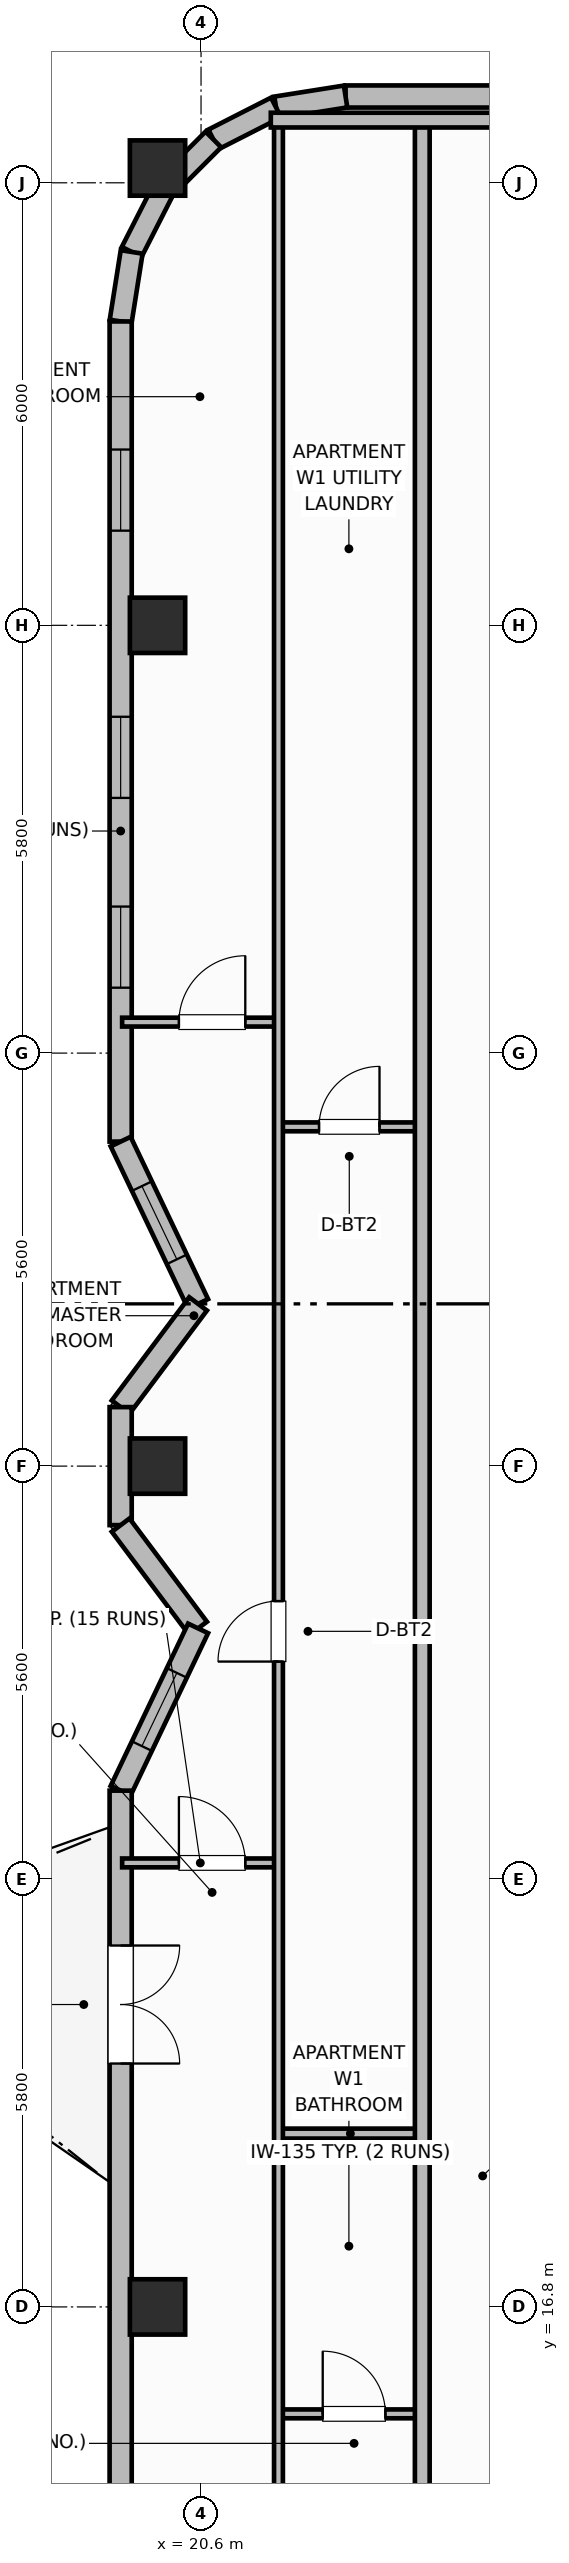
"""IFC4 building model, lengths in metres.
Left out: names, types, materials, properties, quantities, classifications, styles, units other than length and angle.
Written with IfcOpenShell. Run it as: python <this file> out.ifc"""

import sys

from ifc_helpers import new_model, si_unit, direction, frame, frame_2d, origin, origin_2d, place, context, subcontext, project, spatial, rectangle, extrude, element, fill, save


model = new_model("IFC4")
c1 = context("Model", 3, precision=1e-05, world=origin(), true_north=direction((0.0, 1.0)))
c2 = subcontext(c1, "Body", "Model", "MODEL_VIEW")
j1 = project(units=[si_unit("LENGTHUNIT", "METRE"), si_unit("PLANEANGLEUNIT", "RADIAN")], contexts=[c1])
p1 = place(None, origin())
s1 = spatial("IfcSite", under=j1, at=p1, CompositionType="ELEMENT")
p2 = place(p1, origin())
s2 = spatial("IfcBuilding", under=s1, at=p2, CompositionType="ELEMENT")
p3 = place(p2, frame((0.0, 0.0, 275.0)))
s3 = spatial("IfcBuildingStorey", under=s2, at=p3, CompositionType="ELEMENT", Elevation=275.0)
for number, where, z_axis, x_axis in (
    (1, (20.01, 16.8, 0.0), (0.0, 0.0, 1.0), (1.0, 0.0, 0.0)),
    (2, (20.01, 28.2, 0.0), (0.0, 0.0, 1.0), (1.0, 0.0, 0.0)),
    (3, (20.01, 39.6, 0.0), (0.0, 0.0, 1.0), (1.0, 0.0, 0.0)),
    (4, (20.01, 45.8, 0.0), (0.0, 0.0, 1.0), (1.0, 0.0, 0.0)),
):
    element("IfcColumn", number, at=place(p3, frame(where, z_axis=z_axis, x_axis=x_axis)), inside=s3, PredefinedType="COLUMN", context=c2, shape_type="SweptSolid", body=[
        extrude(rectangle(XDim=0.75, YDim=0.75, at=origin_2d()), origin(), (0.0, 0.0, 1.0), 3.7),
    ])
p4 = place(p3, frame((47.79, 46.77, 0.0), z_axis=(0.0, 0.0, 1.0), x_axis=(-1.0, 0.0, 0.0)))
e5 = element("IfcWall", 5, at=p4, inside=s3, PredefinedType="SOLIDWALL", context=c2, shape_type="SweptSolid", body=[
    extrude(rectangle(XDim=25.23, YDim=0.3, at=frame_2d((12.615, 0.0))), origin(), (0.0, 0.0, 1.0), 2.73),
])
p5 = place(p4, frame((1.446, 0.0, 0.76)))
e6 = element("IfcOpeningElement", 6, at=p5, cuts=e5, PredefinedType="OPENING", context=c2, shape_type="SweptSolid", body=[
    extrude(rectangle(XDim=1.4, YDim=1.85, at=frame_2d((0.7, 0.925))), frame((0.0, 0.16, 0.0), z_axis=(0.0, -1.0, 0.0), x_axis=(1.0, 0.0, 0.0)), (0.0, 0.0, 1.0), 0.32),
])
p6 = place(p4, frame((7.428, 0.0, 0.76)))
e7 = element("IfcOpeningElement", 7, at=p6, cuts=e5, PredefinedType="OPENING", context=c2, shape_type="SweptSolid", body=[
    extrude(rectangle(XDim=1.4, YDim=1.85, at=frame_2d((0.7, 0.925))), frame((0.0, 0.16, 0.0), z_axis=(0.0, -1.0, 0.0), x_axis=(1.0, 0.0, 0.0)), (0.0, 0.0, 1.0), 0.32),
])
p7 = place(p4, frame((9.719, 0.0, 0.76)))
e8 = element("IfcOpeningElement", 8, at=p7, cuts=e5, PredefinedType="OPENING", context=c2, shape_type="SweptSolid", body=[
    extrude(rectangle(XDim=1.4, YDim=1.85, at=frame_2d((0.7, 0.925))), frame((0.0, 0.16, 0.0), z_axis=(0.0, -1.0, 0.0), x_axis=(1.0, 0.0, 0.0)), (0.0, 0.0, 1.0), 0.32),
])
p8 = place(p4, frame((14.111, 0.0, 0.76)))
e9 = element("IfcOpeningElement", 9, at=p8, cuts=e5, PredefinedType="OPENING", context=c2, shape_type="SweptSolid", body=[
    extrude(rectangle(XDim=1.4, YDim=1.85, at=frame_2d((0.7, 0.925))), frame((0.0, 0.16, 0.0), z_axis=(0.0, -1.0, 0.0), x_axis=(1.0, 0.0, 0.0)), (0.0, 0.0, 1.0), 0.32),
])
p9 = place(p4, frame((16.402, 0.0, 0.76)))
e10 = element("IfcOpeningElement", 10, at=p9, cuts=e5, PredefinedType="OPENING", context=c2, shape_type="SweptSolid", body=[
    extrude(rectangle(XDim=1.4, YDim=1.85, at=frame_2d((0.7, 0.925))), frame((0.0, 0.16, 0.0), z_axis=(0.0, -1.0, 0.0), x_axis=(1.0, 0.0, 0.0)), (0.0, 0.0, 1.0), 0.32),
])
p10 = place(p4, frame((19.393, 0.0, 0.76)))
e11 = element("IfcOpeningElement", 11, at=p10, cuts=e5, PredefinedType="OPENING", context=c2, shape_type="SweptSolid", body=[
    extrude(rectangle(XDim=1.4, YDim=1.85, at=frame_2d((0.7, 0.925))), frame((0.0, 0.16, 0.0), z_axis=(0.0, -1.0, 0.0), x_axis=(1.0, 0.0, 0.0)), (0.0, 0.0, 1.0), 0.32),
])
p11 = place(p3, frame((22.56, 46.77, 0.0), z_axis=(0.0, 0.0, 1.0), x_axis=(-0.987669453596, -0.156553666304, 0.0)))
e12 = element("IfcWall", 12, at=p11, inside=s3, PredefinedType="SOLIDWALL", context=c2, shape_type="SweptSolid", body=[
    extrude(rectangle(XDim=0.954, YDim=0.3, at=frame_2d((0.477, 0.0))), origin(), (0.0, 0.0, 1.0), 2.73),
])
p12 = place(p3, frame((21.617, 46.621, 0.0), z_axis=(0.0, 0.0, 1.0), x_axis=(-0.891023873617, -0.45395644796, 0.0)))
e13 = element("IfcWall", 13, at=p12, inside=s3, PredefinedType="SOLIDWALL", context=c2, shape_type="SweptSolid", body=[
    extrude(rectangle(XDim=0.954, YDim=0.3, at=frame_2d((0.477, 0.0))), origin(), (0.0, 0.0, 1.0), 2.73),
])
p13 = place(p3, frame((20.767, 46.188, 0.0), z_axis=(0.0, 0.0, 1.0), x_axis=(-0.707106781187, -0.707106781187, 0.0)))
e14 = element("IfcWall", 14, at=p13, inside=s3, PredefinedType="SOLIDWALL", context=c2, shape_type="SweptSolid", body=[
    extrude(rectangle(XDim=0.954, YDim=0.3, at=frame_2d((0.477, 0.0))), origin(), (0.0, 0.0, 1.0), 2.73),
])
p14 = place(p3, frame((20.093, 45.513, 0.0), z_axis=(0.0, 0.0, 1.0), x_axis=(-0.454159573051, -0.890920356825, 0.0)))
e15 = element("IfcWall", 15, at=p14, inside=s3, PredefinedType="SOLIDWALL", context=c2, shape_type="SweptSolid", body=[
    extrude(rectangle(XDim=0.954, YDim=0.3, at=frame_2d((0.477, 0.0))), origin(), (0.0, 0.0, 1.0), 2.73),
])
p15 = place(p3, frame((19.659, 44.663, 0.0), z_axis=(0.0, 0.0, 1.0), x_axis=(-0.156304114255, -0.987708977314, 0.0)))
e16 = element("IfcWall", 16, at=p15, inside=s3, PredefinedType="SOLIDWALL", context=c2, shape_type="SweptSolid", body=[
    extrude(rectangle(XDim=0.954, YDim=0.3, at=frame_2d((0.477, 0.0))), origin(), (0.0, 0.0, 1.0), 2.73),
])
p16 = place(p3, frame((19.51, 43.72, 0.0), z_axis=(0.0, 0.0, 1.0), x_axis=(0.0, -1.0, 0.0)))
e17 = element("IfcWall", 17, at=p16, inside=s3, PredefinedType="SOLIDWALL", context=c2, shape_type="SweptSolid", body=[
    extrude(rectangle(XDim=11.12, YDim=0.3, at=frame_2d((5.56, 0.0))), origin(), (0.0, 0.0, 1.0), 2.73),
])
p17 = place(p16, frame((1.737, 0.0, 0.95)))
e18 = element("IfcOpeningElement", 18, at=p17, cuts=e17, PredefinedType="OPENING", context=c2, shape_type="SweptSolid", body=[
    extrude(rectangle(XDim=1.1, YDim=1.65, at=frame_2d((0.55, 0.825))), frame((0.0, 0.16, 0.0), z_axis=(0.0, -1.0, 0.0), x_axis=(1.0, 0.0, 0.0)), (0.0, 0.0, 1.0), 0.32),
])
p18 = place(p16, frame((5.36, 0.0, 0.95)))
e19 = element("IfcOpeningElement", 19, at=p18, cuts=e17, PredefinedType="OPENING", context=c2, shape_type="SweptSolid", body=[
    extrude(rectangle(XDim=1.1, YDim=1.65, at=frame_2d((0.55, 0.825))), frame((0.0, 0.16, 0.0), z_axis=(0.0, -1.0, 0.0), x_axis=(1.0, 0.0, 0.0)), (0.0, 0.0, 1.0), 0.32),
])
p19 = place(p16, frame((7.933, 0.0, 0.95)))
e20 = element("IfcOpeningElement", 20, at=p19, cuts=e17, PredefinedType="OPENING", context=c2, shape_type="SweptSolid", body=[
    extrude(rectangle(XDim=1.1, YDim=1.65, at=frame_2d((0.55, 0.825))), frame((0.0, 0.16, 0.0), z_axis=(0.0, -1.0, 0.0), x_axis=(1.0, 0.0, 0.0)), (0.0, 0.0, 1.0), 0.32),
])
p20 = place(p3, frame((19.51, 32.6, 0.0), z_axis=(0.0, 0.0, 1.0), x_axis=(0.430714756408, -0.902488115496, 0.0)))
e21 = element("IfcWall", 21, at=p20, inside=s3, PredefinedType="SOLIDWALL", context=c2, shape_type="SweptSolid", body=[
    extrude(rectangle(XDim=2.438, YDim=0.3, at=frame_2d((1.219, 0.0))), origin(), (0.0, 0.0, 1.0), 2.73),
])
p21 = place(p20, frame((0.669, 0.0, 0.92)))
e22 = element("IfcOpeningElement", 22, at=p21, cuts=e21, PredefinedType="OPENING", context=c2, shape_type="SweptSolid", body=[
    extrude(rectangle(XDim=1.1, YDim=1.65, at=frame_2d((0.55, 0.825))), frame((0.0, 0.16, 0.0), z_axis=(0.0, -1.0, 0.0), x_axis=(1.0, 0.0, 0.0)), (0.0, 0.0, 1.0), 0.32),
])
p22 = place(p3, frame((20.56, 30.4, 0.0), z_axis=(0.0, 0.0, 1.0), x_axis=(-0.600044643168, -0.799966515677, 0.0)))
e23 = element("IfcWall", 23, at=p22, inside=s3, PredefinedType="SOLIDWALL", context=c2, shape_type="SweptSolid", body=[
    extrude(rectangle(XDim=1.75, YDim=0.3, at=frame_2d((0.875, 0.0))), origin(), (0.0, 0.0, 1.0), 2.73),
])
p23 = place(p3, frame((19.51, 29.0, 0.0), z_axis=(0.0, 0.0, 1.0), x_axis=(0.0, -1.0, 0.0)))
e24 = element("IfcWall", 24, at=p23, inside=s3, PredefinedType="SOLIDWALL", context=c2, shape_type="SweptSolid", body=[
    extrude(rectangle(XDim=1.6, YDim=0.3, at=frame_2d((0.8, 0.0))), origin(), (0.0, 0.0, 1.0), 2.73),
])
p24 = place(p3, frame((19.51, 27.4, 0.0), z_axis=(0.0, 0.0, 1.0), x_axis=(0.600044643168, -0.799966515677, 0.0)))
e25 = element("IfcWall", 25, at=p24, inside=s3, PredefinedType="SOLIDWALL", context=c2, shape_type="SweptSolid", body=[
    extrude(rectangle(XDim=1.75, YDim=0.3, at=frame_2d((0.875, 0.0))), origin(), (0.0, 0.0, 1.0), 2.73),
])
p25 = place(p3, frame((20.56, 26.0, 0.0), z_axis=(0.0, 0.0, 1.0), x_axis=(-0.430753686581, -0.902469534941, 0.0)))
e26 = element("IfcWall", 26, at=p25, inside=s3, PredefinedType="SOLIDWALL", context=c2, shape_type="SweptSolid", body=[
    extrude(rectangle(XDim=2.438, YDim=0.3, at=frame_2d((1.219, 0.0))), origin(), (0.0, 0.0, 1.0), 2.73),
])
p26 = place(p25, frame((0.669, 0.0, 0.92)))
e27 = element("IfcOpeningElement", 27, at=p26, cuts=e26, PredefinedType="OPENING", context=c2, shape_type="SweptSolid", body=[
    extrude(rectangle(XDim=1.1, YDim=1.65, at=frame_2d((0.55, 0.825))), frame((0.0, 0.16, 0.0), z_axis=(0.0, -1.0, 0.0), x_axis=(1.0, 0.0, 0.0)), (0.0, 0.0, 1.0), 0.32),
])
p27 = place(p3, frame((19.51, 23.8, 0.0), z_axis=(0.0, 0.0, 1.0), x_axis=(0.0, -1.0, 0.0)))
e28 = element("IfcWall", 28, at=p27, inside=s3, PredefinedType="SOLIDWALL", context=c2, shape_type="SweptSolid", body=[
    extrude(rectangle(XDim=11.12, YDim=0.3, at=frame_2d((5.56, 0.0))), origin(), (0.0, 0.0, 1.0), 2.73),
])
p28 = place(p27, frame((2.1, 0.0, 0.0)))
e29 = element("IfcOpeningElement", 29, at=p28, cuts=e28, PredefinedType="OPENING", context=c2, shape_type="SweptSolid", body=[
    extrude(rectangle(XDim=1.6, YDim=2.1, at=frame_2d((0.8, 1.05))), frame((0.0, 0.16, 0.0), z_axis=(0.0, -1.0, 0.0), x_axis=(1.0, 0.0, 0.0)), (0.0, 0.0, 1.0), 0.32),
])
p29 = place(p3, frame((21.65, 15.35, 0.0), z_axis=(0.0, 0.0, 1.0), x_axis=(1.0, 0.0, 0.0)))
e30 = element("IfcWall", 30, at=p29, inside=s3, PredefinedType="PARTITIONING", context=c2, shape_type="SweptSolid", body=[
    extrude(rectangle(XDim=1.95, YDim=0.12, at=frame_2d((0.975, 0.0))), origin(), (0.0, 0.0, 1.0), 2.56),
])
p30 = place(p29, frame((0.6, 0.0, 0.0)))
e31 = element("IfcOpeningElement", 31, at=p30, cuts=e30, PredefinedType="OPENING", context=c2, shape_type="SweptSolid", body=[
    extrude(rectangle(XDim=0.85, YDim=2.1, at=frame_2d((0.425, 1.05))), frame((0.0, 0.07, 0.0), z_axis=(0.0, -1.0, 0.0), x_axis=(1.0, 0.0, 0.0)), (0.0, 0.0, 1.0), 0.14),
])
p31 = place(p3, frame((21.65, 19.15, 0.0), z_axis=(0.0, 0.0, 1.0), x_axis=(1.0, 0.0, 0.0)))
e32 = element("IfcWall", 32, at=p31, inside=s3, PredefinedType="PARTITIONING", context=c2, shape_type="SweptSolid", body=[
    extrude(rectangle(XDim=1.95, YDim=0.135, at=frame_2d((0.975, 0.0))), origin(), (0.0, 0.0, 1.0), 2.56),
])
p32 = place(p3, frame((21.65, 32.8, 0.0), z_axis=(0.0, 0.0, 1.0), x_axis=(1.0, 0.0, 0.0)))
e33 = element("IfcWall", 33, at=p32, inside=s3, PredefinedType="PARTITIONING", context=c2, shape_type="SweptSolid", body=[
    extrude(rectangle(XDim=1.95, YDim=0.12, at=frame_2d((0.975, 0.0))), origin(), (0.0, 0.0, 1.0), 2.56),
])
p33 = place(p32, frame((0.55, 0.0, 0.0)))
e34 = element("IfcOpeningElement", 34, at=p33, cuts=e33, PredefinedType="OPENING", context=c2, shape_type="SweptSolid", body=[
    extrude(rectangle(XDim=0.82, YDim=2.08, at=frame_2d((0.41, 1.04))), frame((0.0, 0.07, 0.0), z_axis=(0.0, -1.0, 0.0), x_axis=(1.0, 0.0, 0.0)), (0.0, 0.0, 1.0), 0.14),
])
p34 = place(p3, frame((19.53, 22.82, 0.0), z_axis=(0.0, 0.0, 1.0), x_axis=(1.0, 0.0, 0.0)))
e35 = element("IfcWall", 35, at=p34, inside=s3, PredefinedType="PARTITIONING", context=c2, shape_type="SweptSolid", body=[
    extrude(rectangle(XDim=2.12, YDim=0.12, at=frame_2d((1.06, 0.0))), origin(), (0.0, 0.0, 1.0), 2.56),
])
p35 = place(p34, frame((0.77, 0.0, 0.0)))
e36 = element("IfcOpeningElement", 36, at=p35, cuts=e35, PredefinedType="OPENING", context=c2, shape_type="SweptSolid", body=[
    extrude(rectangle(XDim=0.9, YDim=2.1, at=frame_2d((0.45, 1.05))), frame((0.0, 0.07, 0.0), z_axis=(0.0, -1.0, 0.0), x_axis=(1.0, 0.0, 0.0)), (0.0, 0.0, 1.0), 0.14),
])
p36 = place(p3, frame((19.53, 34.22, 0.0), z_axis=(0.0, 0.0, 1.0), x_axis=(1.0, 0.0, 0.0)))
e37 = element("IfcWall", 37, at=p36, inside=s3, PredefinedType="PARTITIONING", context=c2, shape_type="SweptSolid", body=[
    extrude(rectangle(XDim=2.12, YDim=0.12, at=frame_2d((1.06, 0.0))), origin(), (0.0, 0.0, 1.0), 2.56),
])
p37 = place(p36, frame((0.77, 0.0, 0.0)))
e38 = element("IfcOpeningElement", 38, at=p37, cuts=e37, PredefinedType="OPENING", context=c2, shape_type="SweptSolid", body=[
    extrude(rectangle(XDim=0.9, YDim=2.1, at=frame_2d((0.45, 1.05))), frame((0.0, 0.07, 0.0), z_axis=(0.0, -1.0, 0.0), x_axis=(1.0, 0.0, 0.0)), (0.0, 0.0, 1.0), 0.14),
])
p38 = place(p3, frame((21.65, 9.99, 0.0), z_axis=(0.0, 0.0, 1.0), x_axis=(0.0, 1.0, 0.0)))
e39 = element("IfcWall", 39, at=p38, inside=s3, PredefinedType="PARTITIONING", context=c2, shape_type="SweptSolid", body=[
    extrude(rectangle(XDim=36.42, YDim=0.12, at=frame_2d((18.21, 0.0))), origin(), (0.0, 0.0, 1.0), 2.56),
])
p39 = place(p38, frame((0.41, 0.0, 0.0)))
e40 = element("IfcOpeningElement", 40, at=p39, cuts=e39, PredefinedType="OPENING", context=c2, shape_type="SweptSolid", body=[
    extrude(rectangle(XDim=0.9, YDim=2.1, at=frame_2d((0.45, 1.05))), frame((0.0, 0.07, 0.0), z_axis=(0.0, -1.0, 0.0), x_axis=(1.0, 0.0, 0.0)), (0.0, 0.0, 1.0), 0.14),
])
p40 = place(p38, frame((15.56, 0.0, 0.0)))
e41 = element("IfcOpeningElement", 41, at=p40, cuts=e39, PredefinedType="OPENING", context=c2, shape_type="SweptSolid", body=[
    extrude(rectangle(XDim=0.82, YDim=2.08, at=frame_2d((0.41, 1.04))), frame((0.0, 0.07, 0.0), z_axis=(0.0, -1.0, 0.0), x_axis=(1.0, 0.0, 0.0)), (0.0, 0.0, 1.0), 0.14),
])
p41 = place(p3, frame((23.6, 9.95, 0.0), z_axis=(0.0, 0.0, 1.0), x_axis=(0.0, 1.0, 0.0)))
e42 = element("IfcWall", 42, at=p41, inside=s3, PredefinedType="PARTITIONING", context=c2, shape_type="SweptSolid", body=[
    extrude(rectangle(XDim=36.5, YDim=0.2, at=frame_2d((18.25, 0.0))), origin(), (0.0, 0.0, 1.0), 2.56),
])
p42 = place(p41, frame((3.25, 0.0, 0.0)))
e43 = element("IfcOpeningElement", 43, at=p42, cuts=e42, PredefinedType="OPENING", context=c2, shape_type="SweptSolid", body=[
    extrude(rectangle(XDim=1.0, YDim=2.15, at=frame_2d((0.5, 1.075))), frame((0.0, 0.11, 0.0), z_axis=(0.0, -1.0, 0.0), x_axis=(1.0, 0.0, 0.0)), (0.0, 0.0, 1.0), 0.22),
])
p43 = place(p3, frame((21.546, 46.45, 0.0), z_axis=(0.0, 0.0, 1.0), x_axis=(1.0, 0.0, 0.0)))
e44 = element("IfcWall", 44, at=p43, inside=s3, PredefinedType="PARTITIONING", context=c2, shape_type="SweptSolid", body=[
    extrude(rectangle(XDim=3.754, YDim=0.2, at=frame_2d((1.877, 0.0))), origin(), (0.0, 0.0, 1.0), 2.56),
])
p44 = place(p17, origin())
e45 = element("IfcWindow", 45, at=p44, inside=s3, PartitioningType="SINGLE_PANEL", PredefinedType="WINDOW", context=c2, shape_type="SweptSolid", body=[
    extrude(rectangle(XDim=1.1, YDim=1.65, at=frame_2d((0.55, 0.825))), frame((0.0, 0.03, 0.0), z_axis=(0.0, -1.0, 0.0), x_axis=(1.0, 0.0, 0.0)), (0.0, 0.0, 1.0), 0.06),
])
fill(e18, e45)
p45 = place(p18, origin())
e46 = element("IfcWindow", 46, at=p45, inside=s3, PartitioningType="SINGLE_PANEL", PredefinedType="WINDOW", context=c2, shape_type="SweptSolid", body=[
    extrude(rectangle(XDim=1.1, YDim=1.65, at=frame_2d((0.55, 0.825))), frame((0.0, 0.03, 0.0), z_axis=(0.0, -1.0, 0.0), x_axis=(1.0, 0.0, 0.0)), (0.0, 0.0, 1.0), 0.06),
])
fill(e19, e46)
p46 = place(p19, origin())
e47 = element("IfcWindow", 47, at=p46, inside=s3, PartitioningType="SINGLE_PANEL", PredefinedType="WINDOW", context=c2, shape_type="SweptSolid", body=[
    extrude(rectangle(XDim=1.1, YDim=1.65, at=frame_2d((0.55, 0.825))), frame((0.0, 0.03, 0.0), z_axis=(0.0, -1.0, 0.0), x_axis=(1.0, 0.0, 0.0)), (0.0, 0.0, 1.0), 0.06),
])
fill(e20, e47)
p47 = place(p21, origin())
e48 = element("IfcWindow", 48, at=p47, inside=s3, PartitioningType="SINGLE_PANEL", PredefinedType="WINDOW", context=c2, shape_type="SweptSolid", body=[
    extrude(rectangle(XDim=1.1, YDim=1.65, at=frame_2d((0.55, 0.825))), frame((0.0, 0.03, 0.0), z_axis=(0.0, -1.0, 0.0), x_axis=(1.0, 0.0, 0.0)), (0.0, 0.0, 1.0), 0.06),
])
fill(e22, e48)
p48 = place(p26, origin())
e49 = element("IfcWindow", 49, at=p48, inside=s3, PartitioningType="SINGLE_PANEL", PredefinedType="WINDOW", context=c2, shape_type="SweptSolid", body=[
    extrude(rectangle(XDim=1.1, YDim=1.65, at=frame_2d((0.55, 0.825))), frame((0.0, 0.03, 0.0), z_axis=(0.0, -1.0, 0.0), x_axis=(1.0, 0.0, 0.0)), (0.0, 0.0, 1.0), 0.06),
])
fill(e27, e49)
p49 = place(p28, origin())
e50 = element("IfcDoor", 50, at=p49, inside=s3, OperationType="DOUBLE_DOOR_SINGLE_SWING", PredefinedType="DOOR", context=c2, shape_type="SweptSolid", body=[
    extrude(rectangle(XDim=1.6, YDim=2.1, at=frame_2d((0.8, 1.05))), frame((0.0, 0.025, 0.0), z_axis=(0.0, -1.0, 0.0), x_axis=(1.0, 0.0, 0.0)), (0.0, 0.0, 1.0), 0.05),
])
fill(e29, e50)
p50 = place(p30, origin())
e51 = element("IfcDoor", 51, at=p50, inside=s3, OperationType="SINGLE_SWING_LEFT", PredefinedType="DOOR", context=c2, shape_type="SweptSolid", body=[
    extrude(rectangle(XDim=0.85, YDim=2.1, at=frame_2d((0.425, 1.05))), frame((0.0, 0.025, 0.0), z_axis=(0.0, -1.0, 0.0), x_axis=(1.0, 0.0, 0.0)), (0.0, 0.0, 1.0), 0.05),
])
fill(e31, e51)
p51 = place(p33, origin())
e52 = element("IfcDoor", 52, at=p51, inside=s3, OperationType="SINGLE_SWING_RIGHT", PredefinedType="DOOR", context=c2, shape_type="SweptSolid", body=[
    extrude(rectangle(XDim=0.82, YDim=2.08, at=frame_2d((0.41, 1.04))), frame((0.0, 0.025, 0.0), z_axis=(0.0, -1.0, 0.0), x_axis=(1.0, 0.0, 0.0)), (0.0, 0.0, 1.0), 0.05),
])
fill(e34, e52)
p52 = place(p35, origin())
e53 = element("IfcDoor", 53, at=p52, inside=s3, OperationType="SINGLE_SWING_LEFT", PredefinedType="DOOR", context=c2, shape_type="SweptSolid", body=[
    extrude(rectangle(XDim=0.9, YDim=2.1, at=frame_2d((0.45, 1.05))), frame((0.0, 0.025, 0.0), z_axis=(0.0, -1.0, 0.0), x_axis=(1.0, 0.0, 0.0)), (0.0, 0.0, 1.0), 0.05),
])
fill(e36, e53)
p53 = place(p37, origin())
e54 = element("IfcDoor", 54, at=p53, inside=s3, OperationType="SINGLE_SWING_RIGHT", PredefinedType="DOOR", context=c2, shape_type="SweptSolid", body=[
    extrude(rectangle(XDim=0.9, YDim=2.1, at=frame_2d((0.45, 1.05))), frame((0.0, 0.025, 0.0), z_axis=(0.0, -1.0, 0.0), x_axis=(1.0, 0.0, 0.0)), (0.0, 0.0, 1.0), 0.05),
])
fill(e38, e54)
p54 = place(p40, origin())
e55 = element("IfcDoor", 55, at=p54, inside=s3, OperationType="SINGLE_SWING_LEFT", PredefinedType="DOOR", context=c2, shape_type="SweptSolid", body=[
    extrude(rectangle(XDim=0.82, YDim=2.08, at=frame_2d((0.41, 1.04))), frame((0.0, 0.025, 0.0), z_axis=(0.0, -1.0, 0.0), x_axis=(1.0, 0.0, 0.0)), (0.0, 0.0, 1.0), 0.05),
])
fill(e41, e55)
save(model, sys.argv[1])
